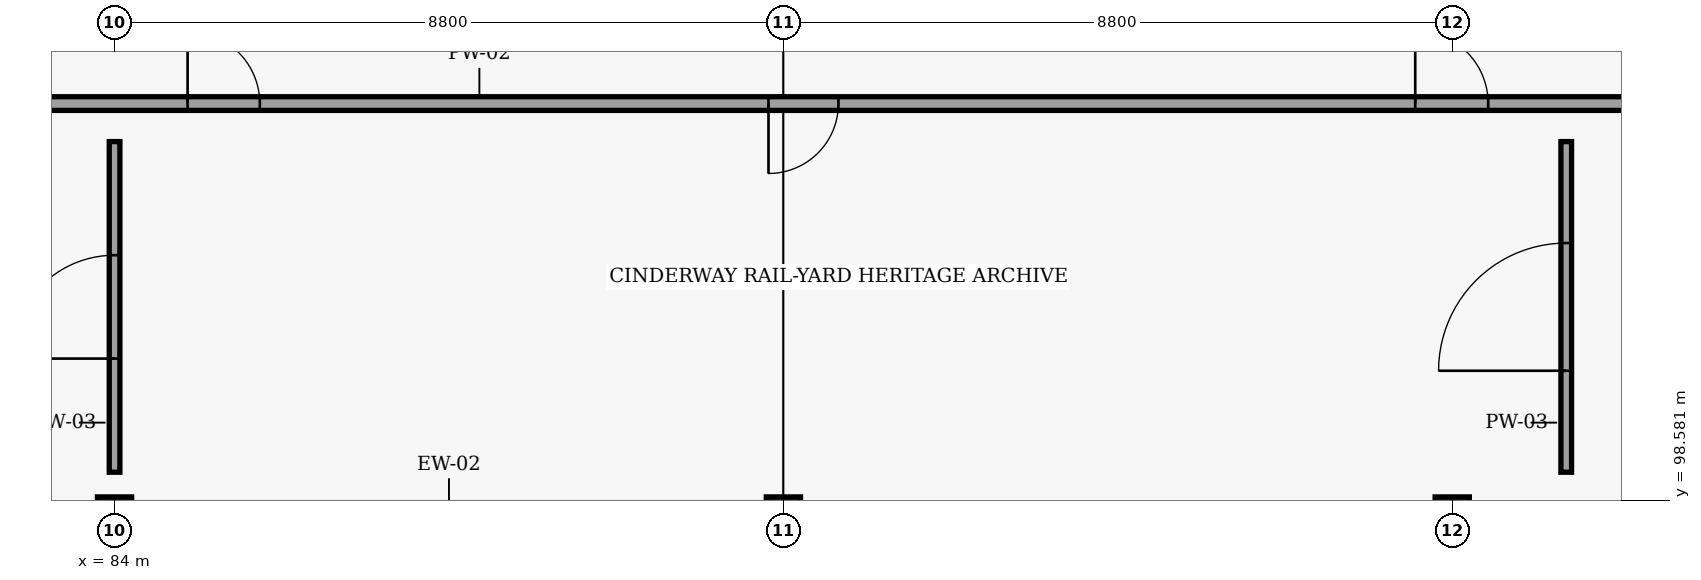
"""IFC4 building model, lengths in metres.
Left out: names, types, materials, properties, quantities, classifications, styles, units other than length and angle.
Written with IfcOpenShell. Run it as: python <this file> out.ifc"""

import sys

from ifc_helpers import new_model, si_unit, direction, frame, frame_2d, origin, origin_2d, place, context, subcontext, project, spatial, rectangle, extrude, element, fill, save


model = new_model("IFC4")
c1 = context("Model", 3, precision=1e-05, world=origin(), true_north=direction((0.0, 1.0)))
c2 = subcontext(c1, "Body", "Model", "MODEL_VIEW")
j1 = project(units=[si_unit("LENGTHUNIT", "METRE"), si_unit("PLANEANGLEUNIT", "RADIAN")], contexts=[c1])
p1 = place(None, origin())
s1 = spatial("IfcSite", under=j1, at=p1, CompositionType="ELEMENT")
p2 = place(p1, origin())
s2 = spatial("IfcBuilding", under=s1, at=p2, CompositionType="ELEMENT")
p3 = place(p2, frame((0.0, 0.0, 20.1)))
s3 = spatial("IfcBuildingStorey", under=s2, at=p3, CompositionType="ELEMENT", Elevation=20.1)
for number, where, z_axis, x_axis in (
    (1, (84.0, 98.4, 0.0), (0.0, 0.0, 1.0), (1.0, 0.0, 0.0)),
    (2, (92.8, 98.4, 0.0), (0.0, 0.0, 1.0), (1.0, 0.0, 0.0)),
    (3, (101.6, 98.4, 0.0), (0.0, 0.0, 1.0), (1.0, 0.0, 0.0)),
):
    element("IfcColumn", number, at=place(p3, frame(where, z_axis=z_axis, x_axis=x_axis)), inside=s3, PredefinedType="COLUMN", context=c2, shape_type="SweptSolid", body=[
        extrude(rectangle(XDim=0.45, YDim=0.45, at=origin_2d()), origin(), (0.0, 0.0, 1.0), 4.2),
    ])
p4 = place(p3, frame((58.95, 103.8, 0.0), z_axis=(0.0, 0.0, 1.0), x_axis=(1.0, 0.0, 0.0)))
e4 = element("IfcWall", 4, at=p4, inside=s3, PredefinedType="PARTITIONING", context=c2, shape_type="SweptSolid", body=[
    extrude(rectangle(XDim=59.7, YDim=0.18, at=frame_2d((29.85, 0.0))), origin(), (0.0, 0.0, 1.0), 3.646),
])
p5 = place(p4, frame((8.029, 0.0, 0.0)))
e5 = element("IfcOpeningElement", 5, at=p5, cuts=e4, PredefinedType="OPENING", context=c2, shape_type="SweptSolid", body=[
    extrude(rectangle(XDim=1.0, YDim=2.14, at=frame_2d((0.5, 1.07))), frame((0.0, 0.1, 0.0), z_axis=(0.0, -1.0, 0.0), x_axis=(1.0, 0.0, 0.0)), (0.0, 0.0, 1.0), 0.2),
])
p6 = place(p4, frame((16.567, 0.0, 0.0)))
e6 = element("IfcOpeningElement", 6, at=p6, cuts=e4, PredefinedType="OPENING", context=c2, shape_type="SweptSolid", body=[
    extrude(rectangle(XDim=0.98, YDim=2.12, at=frame_2d((0.49, 1.06))), frame((0.0, 0.1, 0.0), z_axis=(0.0, -1.0, 0.0), x_axis=(1.0, 0.0, 0.0)), (0.0, 0.0, 1.0), 0.2),
])
p7 = place(p4, frame((26.011, 0.0, 0.0)))
e7 = element("IfcOpeningElement", 7, at=p7, cuts=e4, PredefinedType="OPENING", context=c2, shape_type="SweptSolid", body=[
    extrude(rectangle(XDim=0.95, YDim=2.12, at=frame_2d((0.475, 1.06))), frame((0.0, 0.1, 0.0), z_axis=(0.0, -1.0, 0.0), x_axis=(1.0, 0.0, 0.0)), (0.0, 0.0, 1.0), 0.2),
])
p8 = place(p4, frame((33.654, 0.0, 0.0)))
e8 = element("IfcOpeningElement", 8, at=p8, cuts=e4, PredefinedType="OPENING", context=c2, shape_type="SweptSolid", body=[
    extrude(rectangle(XDim=0.92, YDim=2.1, at=frame_2d((0.46, 1.05))), frame((0.0, 0.1, 0.0), z_axis=(0.0, -1.0, 0.0), x_axis=(1.0, 0.0, 0.0)), (0.0, 0.0, 1.0), 0.2),
])
p9 = place(p4, frame((42.163, 0.0, 0.0)))
e9 = element("IfcOpeningElement", 9, at=p9, cuts=e4, PredefinedType="OPENING", context=c2, shape_type="SweptSolid", body=[
    extrude(rectangle(XDim=0.96, YDim=2.08, at=frame_2d((0.48, 1.04))), frame((0.0, 0.1, 0.0), z_axis=(0.0, -1.0, 0.0), x_axis=(1.0, 0.0, 0.0)), (0.0, 0.0, 1.0), 0.2),
])
p10 = place(p4, frame((50.721, 0.0, 0.0)))
e10 = element("IfcOpeningElement", 10, at=p10, cuts=e4, PredefinedType="OPENING", context=c2, shape_type="SweptSolid", body=[
    extrude(rectangle(XDim=0.9, YDim=2.06, at=frame_2d((0.45, 1.03))), frame((0.0, 0.1, 0.0), z_axis=(0.0, -1.0, 0.0), x_axis=(1.0, 0.0, 0.0)), (0.0, 0.0, 1.0), 0.2),
])
p11 = place(p3, frame((84.0, 98.95, 0.0), z_axis=(0.0, 0.0, 1.0), x_axis=(0.0, 1.0, 0.0)))
e11 = element("IfcWall", 11, at=p11, inside=s3, PredefinedType="PARTITIONING", context=c2, shape_type="SweptSolid", body=[
    extrude(rectangle(XDim=4.35, YDim=0.14, at=frame_2d((2.175, 0.0))), origin(), (0.0, 0.0, 1.0), 3.646),
])
p12 = place(p11, frame((1.495, 0.0, 0.0)))
e12 = element("IfcOpeningElement", 12, at=p12, cuts=e11, PredefinedType="OPENING", context=c2, shape_type="SweptSolid", body=[
    extrude(rectangle(XDim=1.36, YDim=2.22, at=frame_2d((0.68, 1.11))), frame((0.0, 0.08, 0.0), z_axis=(0.0, -1.0, 0.0), x_axis=(1.0, 0.0, 0.0)), (0.0, 0.0, 1.0), 0.16),
])
p13 = place(p3, frame((103.1, 98.95, 0.0), z_axis=(0.0, 0.0, 1.0), x_axis=(0.0, 1.0, 0.0)))
e13 = element("IfcWall", 13, at=p13, inside=s3, PredefinedType="PARTITIONING", context=c2, shape_type="SweptSolid", body=[
    extrude(rectangle(XDim=4.35, YDim=0.14, at=frame_2d((2.175, 0.0))), origin(), (0.0, 0.0, 1.0), 3.985),
])
p14 = place(p13, frame((1.335, 0.0, 0.0)))
e14 = element("IfcOpeningElement", 14, at=p14, cuts=e13, PredefinedType="OPENING", context=c2, shape_type="SweptSolid", body=[
    extrude(rectangle(XDim=1.68, YDim=2.26, at=frame_2d((0.84, 1.13))), frame((0.0, 0.08, 0.0), z_axis=(0.0, -1.0, 0.0), x_axis=(1.0, 0.0, 0.0)), (0.0, 0.0, 1.0), 0.16),
])
p15 = place(p7, origin())
e15 = element("IfcDoor", 15, at=p15, inside=s3, OperationType="SINGLE_SWING_LEFT", PredefinedType="DOOR", context=c2, shape_type="SweptSolid", body=[
    extrude(rectangle(XDim=0.95, YDim=2.12, at=frame_2d((0.475, 1.06))), frame((0.0, 0.025, 0.0), z_axis=(0.0, -1.0, 0.0), x_axis=(1.0, 0.0, 0.0)), (0.0, 0.0, 1.0), 0.05),
])
fill(e7, e15)
p16 = place(p8, origin())
e16 = element("IfcDoor", 16, at=p16, inside=s3, OperationType="SINGLE_SWING_RIGHT", PredefinedType="DOOR", context=c2, shape_type="SweptSolid", body=[
    extrude(rectangle(XDim=0.92, YDim=2.1, at=frame_2d((0.46, 1.05))), frame((0.0, 0.025, 0.0), z_axis=(0.0, -1.0, 0.0), x_axis=(1.0, 0.0, 0.0)), (0.0, 0.0, 1.0), 0.05),
])
fill(e8, e16)
p17 = place(p9, origin())
e17 = element("IfcDoor", 17, at=p17, inside=s3, OperationType="SINGLE_SWING_LEFT", PredefinedType="DOOR", context=c2, shape_type="SweptSolid", body=[
    extrude(rectangle(XDim=0.96, YDim=2.08, at=frame_2d((0.48, 1.04))), frame((0.0, 0.025, 0.0), z_axis=(0.0, -1.0, 0.0), x_axis=(1.0, 0.0, 0.0)), (0.0, 0.0, 1.0), 0.05),
])
fill(e9, e17)
p18 = place(p12, origin())
e18 = element("IfcDoor", 18, at=p18, inside=s3, OperationType="DOUBLE_DOOR_SINGLE_SWING", PredefinedType="DOOR", context=c2, shape_type="SweptSolid", body=[
    extrude(rectangle(XDim=1.36, YDim=2.22, at=frame_2d((0.68, 1.11))), frame((0.0, 0.025, 0.0), z_axis=(0.0, -1.0, 0.0), x_axis=(1.0, 0.0, 0.0)), (0.0, 0.0, 1.0), 0.05),
])
fill(e12, e18)
p19 = place(p14, origin())
e19 = element("IfcDoor", 19, at=p19, inside=s3, OperationType="DOUBLE_DOOR_SINGLE_SWING", PredefinedType="DOOR", context=c2, shape_type="SweptSolid", body=[
    extrude(rectangle(XDim=1.68, YDim=2.26, at=frame_2d((0.84, 1.13))), frame((0.0, 0.025, 0.0), z_axis=(0.0, -1.0, 0.0), x_axis=(1.0, 0.0, 0.0)), (0.0, 0.0, 1.0), 0.05),
])
fill(e14, e19)
save(model, sys.argv[1])
